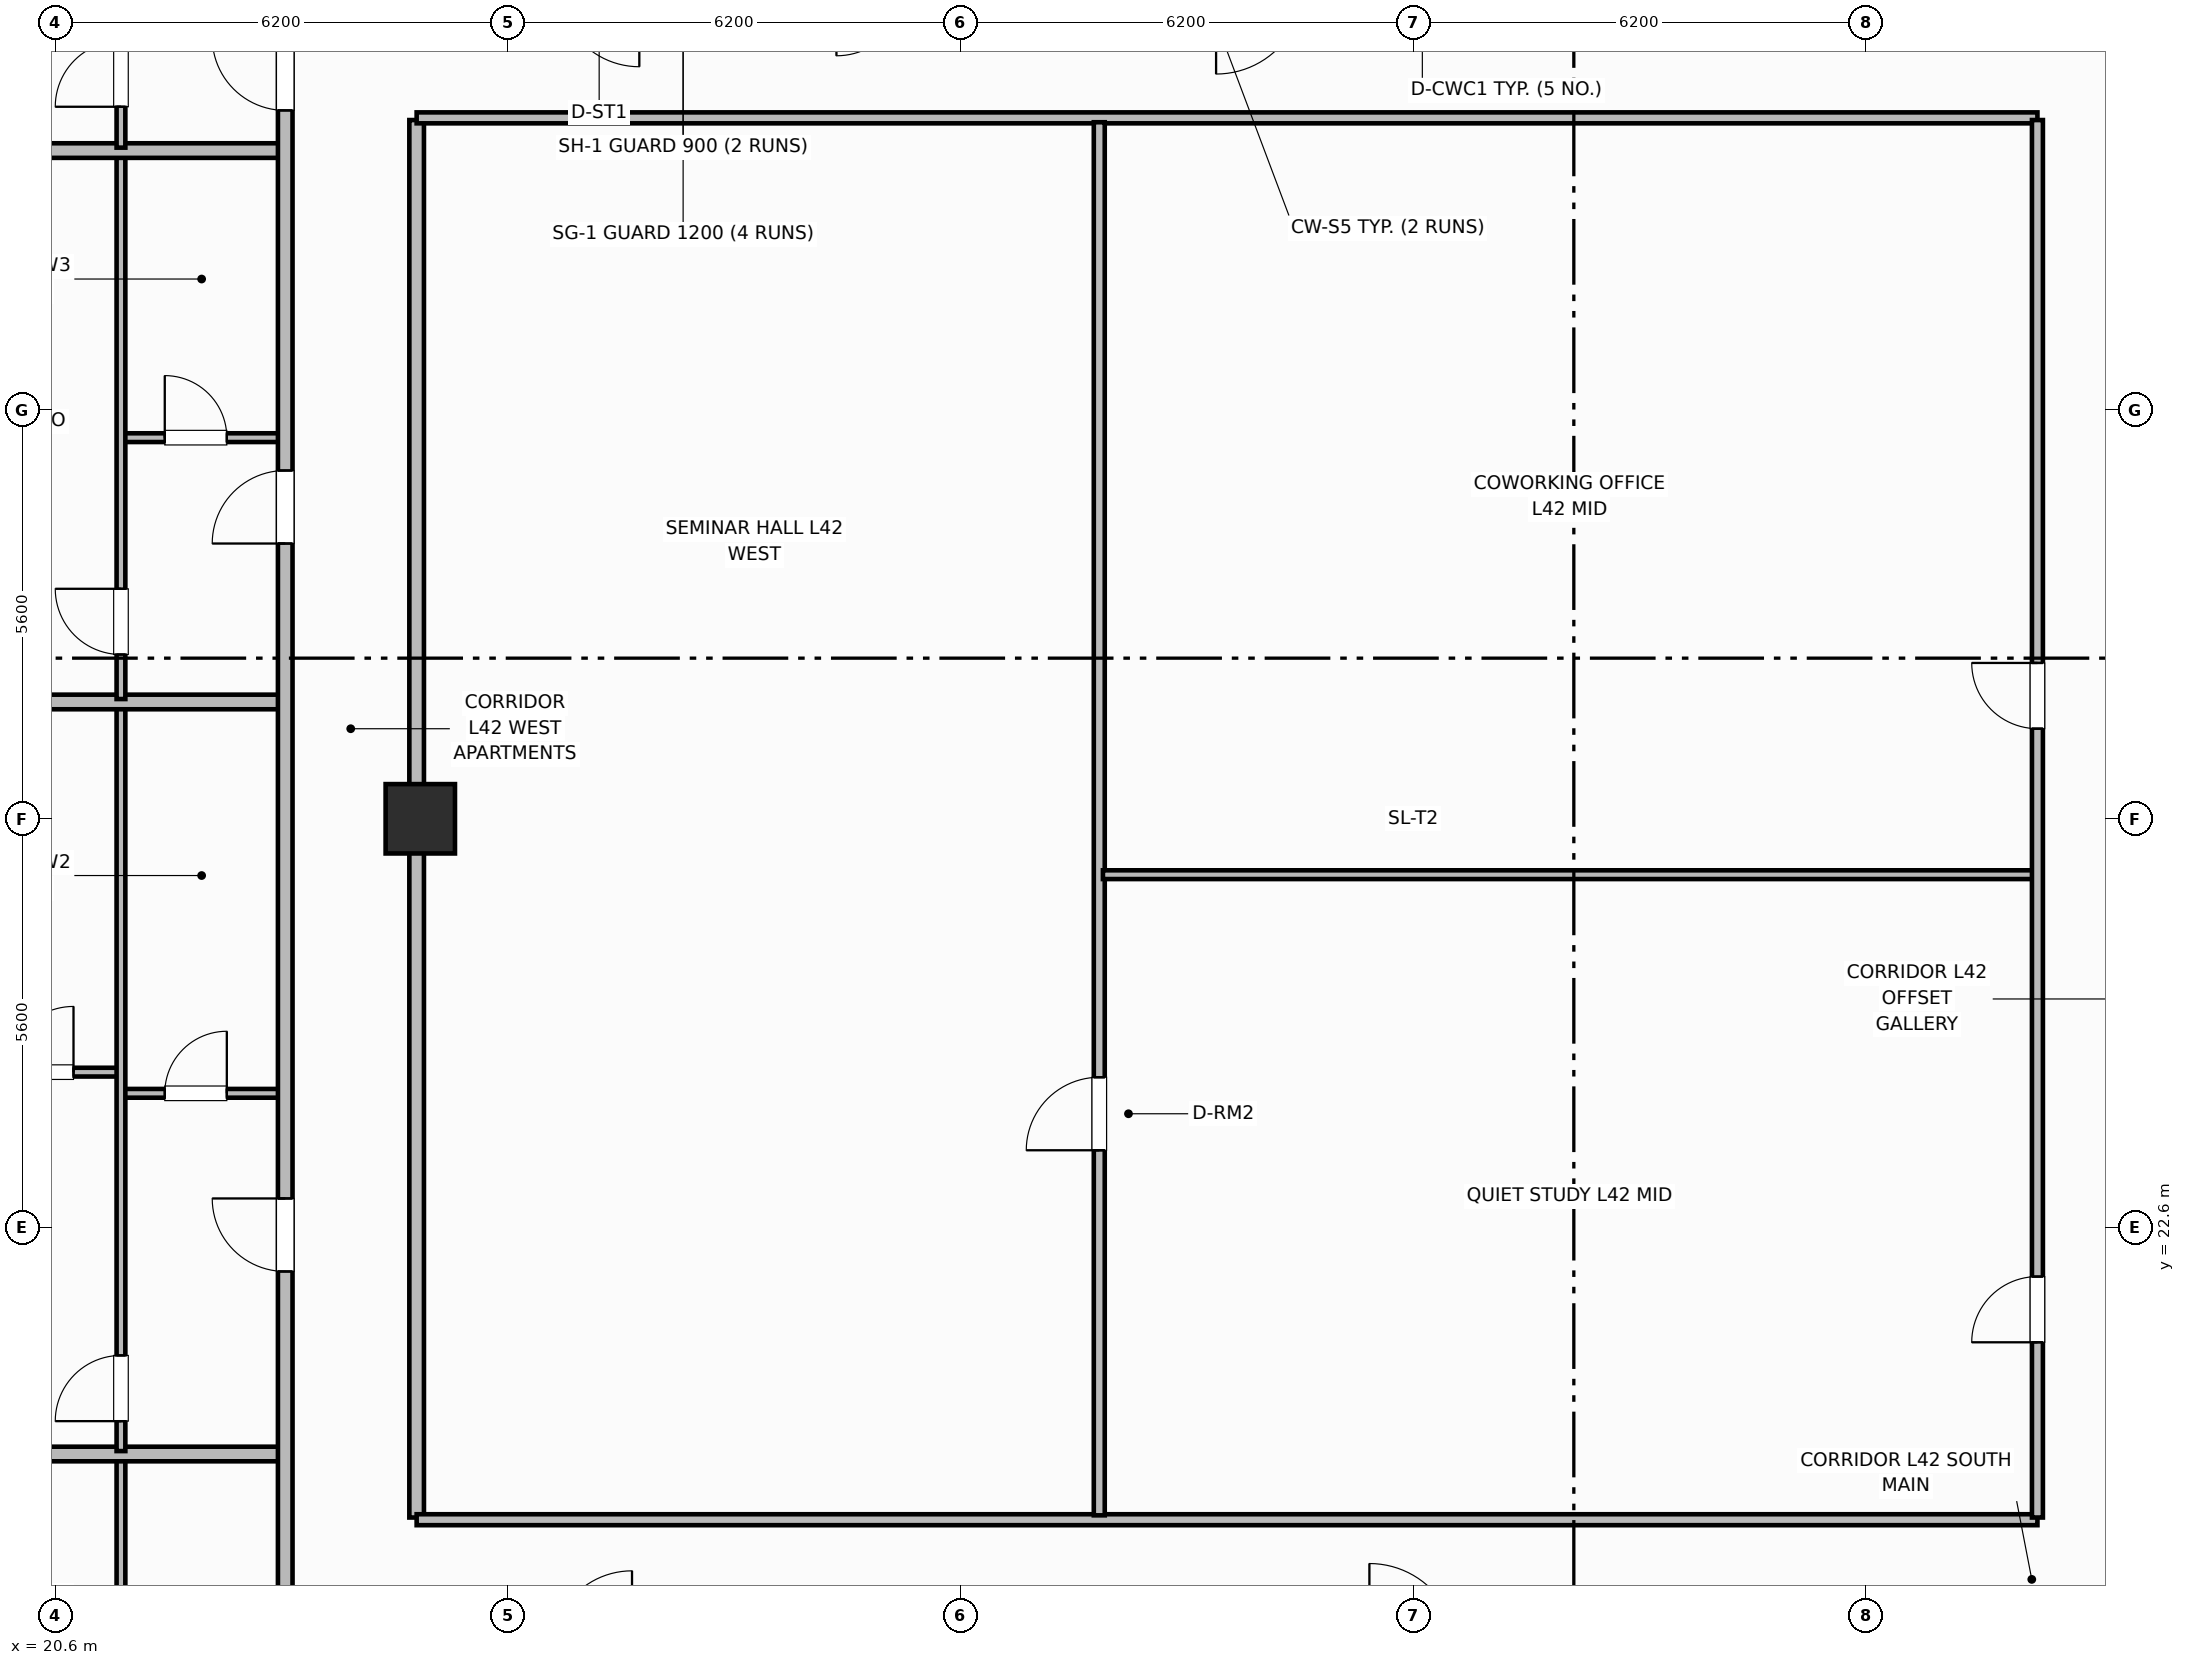
"""IFC4 building model, lengths in metres.
Left out: names, types, materials, properties, quantities, classifications, styles, units other than length and angle.
Written with IfcOpenShell. Run it as: python <this file> out.ifc"""

import sys

from ifc_helpers import new_model, si_unit, direction, frame, frame_2d, origin, origin_2d, place, context, subcontext, project, spatial, rectangle, extrude, element, fill, save


model = new_model("IFC4")
c1 = context("Model", 3, precision=1e-05, world=origin(), true_north=direction((0.0, 1.0)))
c2 = subcontext(c1, "Body", "Model", "MODEL_VIEW")
j1 = project(units=[si_unit("LENGTHUNIT", "METRE"), si_unit("PLANEANGLEUNIT", "RADIAN")], contexts=[c1])
p1 = place(None, origin())
s1 = spatial("IfcSite", under=j1, at=p1, CompositionType="ELEMENT")
p2 = place(p1, origin())
s2 = spatial("IfcBuilding", under=s1, at=p2, CompositionType="ELEMENT")
p3 = place(p2, frame((0.0, 0.0, 170.0)))
s3 = spatial("IfcBuildingStorey", under=s2, at=p3, CompositionType="ELEMENT", Elevation=170.0)
p4 = place(p3, frame((25.6, 28.2, 0.0), z_axis=(0.0, 0.0, 1.0), x_axis=(1.0, 0.0, 0.0)))
e1 = element("IfcColumn", 1, at=p4, inside=s3, PredefinedType="COLUMN", context=c2, shape_type="SweptSolid", body=[
    extrude(rectangle(XDim=0.95, YDim=0.95, at=origin_2d()), origin(), (0.0, 0.0, 1.0), 3.7),
])
p5 = place(p3, frame((25.55, 18.63, 0.0), z_axis=(0.0, 0.0, 1.0), x_axis=(0.0, 1.0, 0.0)))
e2 = element("IfcWall", 2, at=p5, inside=s3, PredefinedType="PARTITIONING", context=c2, shape_type="SweptSolid", body=[
    extrude(rectangle(XDim=19.14, YDim=0.2, at=frame_2d((9.57, 0.0))), origin(), (0.0, 0.0, 1.0), 2.55),
])
for number, where, z_axis, x_axis in (
    (3, (25.55, 18.6, 0.0), (0.0, 0.0, 1.0), (1.0, 0.0, 0.0)),
    (4, (25.55, 37.8, 0.0), (0.0, 0.0, 1.0), (1.0, 0.0, 0.0)),
):
    element("IfcWall", number, at=place(p3, frame(where, z_axis=z_axis, x_axis=x_axis)), inside=s3, PredefinedType="PARTITIONING", context=c2, shape_type="SweptSolid", body=[
        extrude(rectangle(XDim=22.2, YDim=0.15, at=frame_2d((11.1, 0.0))), origin(), (0.0, 0.0, 1.0), 2.55),
    ])
p6 = place(p3, frame((34.9, 18.66, 0.0), z_axis=(0.0, 0.0, 1.0), x_axis=(0.0, 1.0, 0.0)))
e5 = element("IfcWall", 5, at=p6, inside=s3, PredefinedType="PARTITIONING", context=c2, shape_type="SweptSolid", body=[
    extrude(rectangle(XDim=19.08, YDim=0.15, at=frame_2d((9.54, 0.0))), origin(), (0.0, 0.0, 1.0), 2.55),
])
p7 = place(p6, frame((5.0, 0.0, 0.0)))
e6 = element("IfcOpeningElement", 6, at=p7, cuts=e5, PredefinedType="OPENING", context=c2, shape_type="SweptSolid", body=[
    extrude(rectangle(XDim=1.0, YDim=2.15, at=frame_2d((0.5, 1.075))), frame((0.0, 0.085, 0.0), z_axis=(0.0, -1.0, 0.0), x_axis=(1.0, 0.0, 0.0)), (0.0, 0.0, 1.0), 0.17),
])
p8 = place(p3, frame((34.95, 27.434, 0.0), z_axis=(0.0, 0.0, 1.0), x_axis=(1.0, 0.0, 0.0)))
e7 = element("IfcWall", 7, at=p8, inside=s3, PredefinedType="PARTITIONING", context=c2, shape_type="SweptSolid", body=[
    extrude(rectangle(XDim=12.81, YDim=0.12, at=frame_2d((6.405, 0.0))), origin(), (0.0, 0.0, 1.0), 2.55),
])
p9 = place(p3, frame((47.75, 18.63, 0.0), z_axis=(0.0, 0.0, 1.0), x_axis=(0.0, 1.0, 0.0)))
e8 = element("IfcWall", 8, at=p9, inside=s3, PredefinedType="PARTITIONING", context=c2, shape_type="SweptSolid", body=[
    extrude(rectangle(XDim=19.14, YDim=0.15, at=frame_2d((9.57, 0.0))), origin(), (0.0, 0.0, 1.0), 2.55),
])
p10 = place(p9, frame((2.4, 0.0, 0.0)))
e9 = element("IfcOpeningElement", 9, at=p10, cuts=e8, PredefinedType="OPENING", context=c2, shape_type="SweptSolid", body=[
    extrude(rectangle(XDim=0.9, YDim=2.1, at=frame_2d((0.45, 1.05))), frame((0.0, 0.085, 0.0), z_axis=(0.0, -1.0, 0.0), x_axis=(1.0, 0.0, 0.0)), (0.0, 0.0, 1.0), 0.17),
])
p11 = place(p9, frame((10.804, 0.0, 0.0)))
e10 = element("IfcOpeningElement", 10, at=p11, cuts=e8, PredefinedType="OPENING", context=c2, shape_type="SweptSolid", body=[
    extrude(rectangle(XDim=0.9, YDim=2.1, at=frame_2d((0.45, 1.05))), frame((0.0, 0.085, 0.0), z_axis=(0.0, -1.0, 0.0), x_axis=(1.0, 0.0, 0.0)), (0.0, 0.0, 1.0), 0.17),
])
p12 = place(p3, frame((21.5, 10.64, 0.0), z_axis=(0.0, 0.0, 1.0), x_axis=(0.0, 1.0, 0.0)))
e11 = element("IfcWall", 11, at=p12, inside=s3, PredefinedType="PARTITIONING", context=c2, shape_type="SweptSolid", body=[
    extrude(rectangle(XDim=8.82, YDim=0.12, at=frame_2d((4.41, 0.0))), origin(), (0.0, 0.0, 1.0), 2.55),
])
p13 = place(p12, frame((0.41, 0.0, 0.0)))
e12 = element("IfcOpeningElement", 12, at=p13, cuts=e11, PredefinedType="OPENING", context=c2, shape_type="SweptSolid", body=[
    extrude(rectangle(XDim=0.9, YDim=2.1, at=frame_2d((0.45, 1.05))), frame((0.0, 0.07, 0.0), z_axis=(0.0, -1.0, 0.0), x_axis=(1.0, 0.0, 0.0)), (0.0, 0.0, 1.0), 0.14),
])
p14 = place(p3, frame((16.57, 19.5, 0.0), z_axis=(0.0, 0.0, 1.0), x_axis=(1.0, 0.0, 0.0)))
e13 = element("IfcWall", 13, at=p14, inside=s3, PredefinedType="PARTITIONING", context=c2, shape_type="SweptSolid", body=[
    extrude(rectangle(XDim=7.18, YDim=0.2, at=frame_2d((3.59, 0.0))), origin(), (0.0, 0.0, 1.0), 2.55),
])
p15 = place(p3, frame((21.5, 24.44, 0.0), z_axis=(0.0, 0.0, 1.0), x_axis=(1.0, 0.0, 0.0)))
e14 = element("IfcWall", 14, at=p15, inside=s3, PredefinedType="PARTITIONING", context=c2, shape_type="SweptSolid", body=[
    extrude(rectangle(XDim=2.25, YDim=0.12, at=frame_2d((1.125, 0.0))), origin(), (0.0, 0.0, 1.0), 2.55),
])
p16 = place(p15, frame((0.6, 0.0, 0.0)))
e15 = element("IfcOpeningElement", 15, at=p16, cuts=e14, PredefinedType="OPENING", context=c2, shape_type="SweptSolid", body=[
    extrude(rectangle(XDim=0.85, YDim=2.1, at=frame_2d((0.425, 1.05))), frame((0.0, 0.07, 0.0), z_axis=(0.0, -1.0, 0.0), x_axis=(1.0, 0.0, 0.0)), (0.0, 0.0, 1.0), 0.14),
])
p17 = place(p3, frame((17.098, 24.73, 0.0), z_axis=(0.0, 0.0, 1.0), x_axis=(1.0, 0.0, 0.0)))
e16 = element("IfcWall", 16, at=p17, inside=s3, PredefinedType="PARTITIONING", context=c2, shape_type="SweptSolid", body=[
    extrude(rectangle(XDim=4.402, YDim=0.12, at=frame_2d((2.201, 0.0))), origin(), (0.0, 0.0, 1.0), 2.55),
])
p18 = place(p17, frame((2.852, 0.0, 0.0)))
e17 = element("IfcOpeningElement", 17, at=p18, cuts=e16, PredefinedType="OPENING", context=c2, shape_type="SweptSolid", body=[
    extrude(rectangle(XDim=0.9, YDim=2.1, at=frame_2d((0.45, 1.05))), frame((0.0, 0.07, 0.0), z_axis=(0.0, -1.0, 0.0), x_axis=(1.0, 0.0, 0.0)), (0.0, 0.0, 1.0), 0.14),
])
p19 = place(p3, frame((21.5, 19.54, 0.0), z_axis=(0.0, 0.0, 1.0), x_axis=(0.0, 1.0, 0.0)))
e18 = element("IfcWall", 18, at=p19, inside=s3, PredefinedType="PARTITIONING", context=c2, shape_type="SweptSolid", body=[
    extrude(rectangle(XDim=10.22, YDim=0.12, at=frame_2d((5.11, 0.0))), origin(), (0.0, 0.0, 1.0), 2.55),
])
p20 = place(p19, frame((0.41, 0.0, 0.0)))
e19 = element("IfcOpeningElement", 19, at=p20, cuts=e18, PredefinedType="OPENING", context=c2, shape_type="SweptSolid", body=[
    extrude(rectangle(XDim=0.9, YDim=2.1, at=frame_2d((0.45, 1.05))), frame((0.0, 0.07, 0.0), z_axis=(0.0, -1.0, 0.0), x_axis=(1.0, 0.0, 0.0)), (0.0, 0.0, 1.0), 0.14),
])
p21 = place(p3, frame((17.284, 29.8, 0.0), z_axis=(0.0, 0.0, 1.0), x_axis=(1.0, 0.0, 0.0)))
e20 = element("IfcWall", 20, at=p21, inside=s3, PredefinedType="PARTITIONING", context=c2, shape_type="SweptSolid", body=[
    extrude(rectangle(XDim=6.466, YDim=0.2, at=frame_2d((3.233, 0.0))), origin(), (0.0, 0.0, 1.0), 2.55),
])
p22 = place(p3, frame((21.5, 33.42, 0.0), z_axis=(0.0, 0.0, 1.0), x_axis=(1.0, 0.0, 0.0)))
e21 = element("IfcWall", 21, at=p22, inside=s3, PredefinedType="PARTITIONING", context=c2, shape_type="SweptSolid", body=[
    extrude(rectangle(XDim=2.25, YDim=0.12, at=frame_2d((1.125, 0.0))), origin(), (0.0, 0.0, 1.0), 2.55),
])
p23 = place(p22, frame((0.6, 0.0, 0.0)))
e22 = element("IfcOpeningElement", 22, at=p23, cuts=e21, PredefinedType="OPENING", context=c2, shape_type="SweptSolid", body=[
    extrude(rectangle(XDim=0.85, YDim=2.1, at=frame_2d((0.425, 1.05))), frame((0.0, 0.07, 0.0), z_axis=(0.0, -1.0, 0.0), x_axis=(1.0, 0.0, 0.0)), (0.0, 0.0, 1.0), 0.14),
])
p24 = place(p3, frame((21.5, 29.84, 0.0), z_axis=(0.0, 0.0, 1.0), x_axis=(0.0, 1.0, 0.0)))
e23 = element("IfcWall", 23, at=p24, inside=s3, PredefinedType="PARTITIONING", context=c2, shape_type="SweptSolid", body=[
    extrude(rectangle(XDim=7.472, YDim=0.12, at=frame_2d((3.736, 0.0))), origin(), (0.0, 0.0, 1.0), 2.55),
])
p25 = place(p24, frame((0.61, 0.0, 0.0)))
e24 = element("IfcOpeningElement", 24, at=p25, cuts=e23, PredefinedType="OPENING", context=c2, shape_type="SweptSolid", body=[
    extrude(rectangle(XDim=0.9, YDim=2.1, at=frame_2d((0.45, 1.05))), frame((0.0, 0.07, 0.0), z_axis=(0.0, -1.0, 0.0), x_axis=(1.0, 0.0, 0.0)), (0.0, 0.0, 1.0), 0.14),
])
p26 = place(p3, frame((16.57, 37.352, 0.0), z_axis=(0.0, 0.0, 1.0), x_axis=(1.0, 0.0, 0.0)))
e25 = element("IfcWall", 25, at=p26, inside=s3, PredefinedType="PARTITIONING", context=c2, shape_type="SweptSolid", body=[
    extrude(rectangle(XDim=7.18, YDim=0.2, at=frame_2d((3.59, 0.0))), origin(), (0.0, 0.0, 1.0), 2.55),
])
p27 = place(p3, frame((21.5, 37.392, 0.0), z_axis=(0.0, 0.0, 1.0), x_axis=(0.0, 1.0, 0.0)))
e26 = element("IfcWall", 26, at=p27, inside=s3, PredefinedType="PARTITIONING", context=c2, shape_type="SweptSolid", body=[
    extrude(rectangle(XDim=8.368, YDim=0.12, at=frame_2d((4.184, 0.0))), origin(), (0.0, 0.0, 1.0), 2.55),
])
p28 = place(p27, frame((0.56, 0.0, 0.0)))
e27 = element("IfcOpeningElement", 27, at=p28, cuts=e26, PredefinedType="OPENING", context=c2, shape_type="SweptSolid", body=[
    extrude(rectangle(XDim=0.9, YDim=2.1, at=frame_2d((0.45, 1.05))), frame((0.0, 0.07, 0.0), z_axis=(0.0, -1.0, 0.0), x_axis=(1.0, 0.0, 0.0)), (0.0, 0.0, 1.0), 0.14),
])
p29 = place(p3, frame((23.75, 10.6, 0.0), z_axis=(0.0, 0.0, 1.0), x_axis=(0.0, 1.0, 0.0)))
e28 = element("IfcWall", 28, at=p29, inside=s3, PredefinedType="PARTITIONING", context=c2, shape_type="SweptSolid", body=[
    extrude(rectangle(XDim=35.2, YDim=0.2, at=frame_2d((17.6, 0.0))), origin(), (0.0, 0.0, 1.0), 2.55),
])
p30 = place(p29, frame((2.65, 0.0, 0.0)))
e29 = element("IfcOpeningElement", 29, at=p30, cuts=e28, PredefinedType="OPENING", context=c2, shape_type="SweptSolid", body=[
    extrude(rectangle(XDim=1.0, YDim=2.15, at=frame_2d((0.5, 1.075))), frame((0.0, 0.11, 0.0), z_axis=(0.0, -1.0, 0.0), x_axis=(1.0, 0.0, 0.0)), (0.0, 0.0, 1.0), 0.22),
])
p31 = place(p29, frame((11.4, 0.0, 0.0)))
e30 = element("IfcOpeningElement", 30, at=p31, cuts=e28, PredefinedType="OPENING", context=c2, shape_type="SweptSolid", body=[
    extrude(rectangle(XDim=1.0, YDim=2.15, at=frame_2d((0.5, 1.075))), frame((0.0, 0.11, 0.0), z_axis=(0.0, -1.0, 0.0), x_axis=(1.0, 0.0, 0.0)), (0.0, 0.0, 1.0), 0.22),
])
p32 = place(p29, frame((21.37, 0.0, 0.0)))
e31 = element("IfcOpeningElement", 31, at=p32, cuts=e28, PredefinedType="OPENING", context=c2, shape_type="SweptSolid", body=[
    extrude(rectangle(XDim=1.0, YDim=2.15, at=frame_2d((0.5, 1.075))), frame((0.0, 0.11, 0.0), z_axis=(0.0, -1.0, 0.0), x_axis=(1.0, 0.0, 0.0)), (0.0, 0.0, 1.0), 0.22),
])
p33 = place(p29, frame((27.302, 0.0, 0.0)))
e32 = element("IfcOpeningElement", 32, at=p33, cuts=e28, PredefinedType="OPENING", context=c2, shape_type="SweptSolid", body=[
    extrude(rectangle(XDim=1.0, YDim=2.15, at=frame_2d((0.5, 1.075))), frame((0.0, 0.11, 0.0), z_axis=(0.0, -1.0, 0.0), x_axis=(1.0, 0.0, 0.0)), (0.0, 0.0, 1.0), 0.22),
])
p34 = place(p7, origin())
e33 = element("IfcDoor", 33, at=p34, inside=s3, OperationType="SINGLE_SWING_LEFT", PredefinedType="DOOR", context=c2, shape_type="SweptSolid", body=[
    extrude(rectangle(XDim=1.0, YDim=2.15, at=frame_2d((0.5, 1.075))), frame((0.0, 0.025, 0.0), z_axis=(0.0, -1.0, 0.0), x_axis=(1.0, 0.0, 0.0)), (0.0, 0.0, 1.0), 0.05),
])
fill(e6, e33)
p35 = place(p10, origin())
e34 = element("IfcDoor", 34, at=p35, inside=s3, OperationType="SINGLE_SWING_LEFT", PredefinedType="DOOR", context=c2, shape_type="SweptSolid", body=[
    extrude(rectangle(XDim=0.9, YDim=2.1, at=frame_2d((0.45, 1.05))), frame((0.0, 0.025, 0.0), z_axis=(0.0, -1.0, 0.0), x_axis=(1.0, 0.0, 0.0)), (0.0, 0.0, 1.0), 0.05),
])
fill(e9, e34)
p36 = place(p11, origin())
e35 = element("IfcDoor", 35, at=p36, inside=s3, OperationType="SINGLE_SWING_RIGHT", PredefinedType="DOOR", context=c2, shape_type="SweptSolid", body=[
    extrude(rectangle(XDim=0.9, YDim=2.1, at=frame_2d((0.45, 1.05))), frame((0.0, 0.025, 0.0), z_axis=(0.0, -1.0, 0.0), x_axis=(1.0, 0.0, 0.0)), (0.0, 0.0, 1.0), 0.05),
])
fill(e10, e35)
p37 = place(p16, origin())
e36 = element("IfcDoor", 36, at=p37, inside=s3, OperationType="SINGLE_SWING_RIGHT", PredefinedType="DOOR", context=c2, shape_type="SweptSolid", body=[
    extrude(rectangle(XDim=0.85, YDim=2.1, at=frame_2d((0.425, 1.05))), frame((0.0, 0.025, 0.0), z_axis=(0.0, -1.0, 0.0), x_axis=(1.0, 0.0, 0.0)), (0.0, 0.0, 1.0), 0.05),
])
fill(e15, e36)
p38 = place(p18, origin())
e37 = element("IfcDoor", 37, at=p38, inside=s3, OperationType="SINGLE_SWING_RIGHT", PredefinedType="DOOR", context=c2, shape_type="SweptSolid", body=[
    extrude(rectangle(XDim=0.9, YDim=2.1, at=frame_2d((0.45, 1.05))), frame((0.0, 0.025, 0.0), z_axis=(0.0, -1.0, 0.0), x_axis=(1.0, 0.0, 0.0)), (0.0, 0.0, 1.0), 0.05),
])
fill(e17, e37)
p39 = place(p20, origin())
e38 = element("IfcDoor", 38, at=p39, inside=s3, OperationType="SINGLE_SWING_LEFT", PredefinedType="DOOR", context=c2, shape_type="SweptSolid", body=[
    extrude(rectangle(XDim=0.9, YDim=2.1, at=frame_2d((0.45, 1.05))), frame((0.0, 0.025, 0.0), z_axis=(0.0, -1.0, 0.0), x_axis=(1.0, 0.0, 0.0)), (0.0, 0.0, 1.0), 0.05),
])
fill(e19, e38)
p40 = place(p23, origin())
e39 = element("IfcDoor", 39, at=p40, inside=s3, OperationType="SINGLE_SWING_LEFT", PredefinedType="DOOR", context=c2, shape_type="SweptSolid", body=[
    extrude(rectangle(XDim=0.85, YDim=2.1, at=frame_2d((0.425, 1.05))), frame((0.0, 0.025, 0.0), z_axis=(0.0, -1.0, 0.0), x_axis=(1.0, 0.0, 0.0)), (0.0, 0.0, 1.0), 0.05),
])
fill(e22, e39)
p41 = place(p25, origin())
e40 = element("IfcDoor", 40, at=p41, inside=s3, OperationType="SINGLE_SWING_RIGHT", PredefinedType="DOOR", context=c2, shape_type="SweptSolid", body=[
    extrude(rectangle(XDim=0.9, YDim=2.1, at=frame_2d((0.45, 1.05))), frame((0.0, 0.025, 0.0), z_axis=(0.0, -1.0, 0.0), x_axis=(1.0, 0.0, 0.0)), (0.0, 0.0, 1.0), 0.05),
])
fill(e24, e40)
p42 = place(p28, origin())
e41 = element("IfcDoor", 41, at=p42, inside=s3, OperationType="SINGLE_SWING_LEFT", PredefinedType="DOOR", context=c2, shape_type="SweptSolid", body=[
    extrude(rectangle(XDim=0.9, YDim=2.1, at=frame_2d((0.45, 1.05))), frame((0.0, 0.025, 0.0), z_axis=(0.0, -1.0, 0.0), x_axis=(1.0, 0.0, 0.0)), (0.0, 0.0, 1.0), 0.05),
])
fill(e27, e41)
p43 = place(p31, origin())
e42 = element("IfcDoor", 42, at=p43, inside=s3, OperationType="SINGLE_SWING_RIGHT", PredefinedType="DOOR", context=c2, shape_type="SweptSolid", body=[
    extrude(rectangle(XDim=1.0, YDim=2.15, at=frame_2d((0.5, 1.075))), frame((0.0, 0.025, 0.0), z_axis=(0.0, -1.0, 0.0), x_axis=(1.0, 0.0, 0.0)), (0.0, 0.0, 1.0), 0.05),
])
fill(e30, e42)
p44 = place(p32, origin())
e43 = element("IfcDoor", 43, at=p44, inside=s3, OperationType="SINGLE_SWING_LEFT", PredefinedType="DOOR", context=c2, shape_type="SweptSolid", body=[
    extrude(rectangle(XDim=1.0, YDim=2.15, at=frame_2d((0.5, 1.075))), frame((0.0, 0.025, 0.0), z_axis=(0.0, -1.0, 0.0), x_axis=(1.0, 0.0, 0.0)), (0.0, 0.0, 1.0), 0.05),
])
fill(e31, e43)
p45 = place(p33, origin())
e44 = element("IfcDoor", 44, at=p45, inside=s3, OperationType="SINGLE_SWING_RIGHT", PredefinedType="DOOR", context=c2, shape_type="SweptSolid", body=[
    extrude(rectangle(XDim=1.0, YDim=2.15, at=frame_2d((0.5, 1.075))), frame((0.0, 0.025, 0.0), z_axis=(0.0, -1.0, 0.0), x_axis=(1.0, 0.0, 0.0)), (0.0, 0.0, 1.0), 0.05),
])
fill(e32, e44)
save(model, sys.argv[1])
